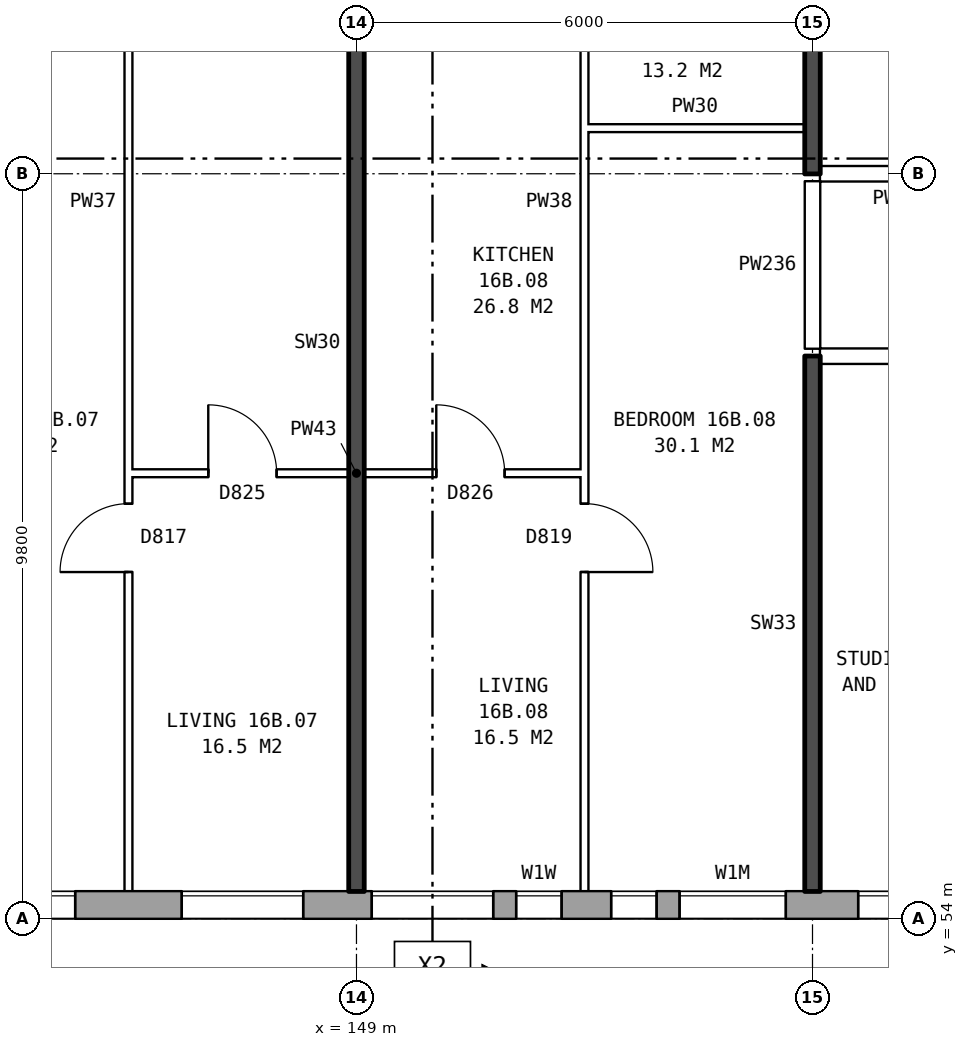
"""IFC4 building model, lengths in metres.
Left out: names, types, materials, properties, quantities, classifications, styles, units other than length and angle.
Written with IfcOpenShell. Run it as: python <this file> out.ifc"""

import sys

from ifc_helpers import new_model, si_unit, direction, frame, frame_2d, origin, place, context, subcontext, project, spatial, rectangle, extrude, element, fill, save


model = new_model("IFC4")
c1 = context("Model", 3, precision=1e-05, world=origin(), true_north=direction((0.0, 1.0)))
c2 = subcontext(c1, "Body", "Model", "MODEL_VIEW")
j1 = project(units=[si_unit("LENGTHUNIT", "METRE"), si_unit("PLANEANGLEUNIT", "RADIAN")], contexts=[c1])
p1 = place(None, origin())
s1 = spatial("IfcSite", under=j1, at=p1, CompositionType="ELEMENT")
p2 = place(p1, origin())
s2 = spatial("IfcBuilding", under=s1, at=p2, CompositionType="ELEMENT")
p3 = place(p2, frame((0.0, 0.0, 59.8)))
s3 = spatial("IfcBuildingStorey", under=s2, at=p3, CompositionType="ELEMENT", Elevation=59.8)
p4 = place(p3, frame((134.075, 54.18, 0.0), z_axis=(0.0, 0.0, 1.0), x_axis=(1.0, 0.0, 0.0)))
e1 = element("IfcWall", 1, at=p4, inside=s3, PredefinedType="STANDARD", context=c2, shape_type="SweptSolid", body=[
    extrude(rectangle(XDim=39.351, YDim=0.36, at=frame_2d((19.675, 0.0))), origin(), (0.0, 0.0, 1.0), 2.85),
])
p5 = place(p4, frame((0.625, 0.0, 0.8)))
e2 = element("IfcOpeningElement", 2, at=p5, cuts=e1, PredefinedType="OPENING", context=c2, shape_type="SweptSolid", body=[
    extrude(rectangle(XDim=1.6, YDim=1.8, at=frame_2d((0.8, 0.9))), frame((0.0, 0.19, 0.0), z_axis=(0.0, -1.0, 0.0), x_axis=(1.0, 0.0, 0.0)), (0.0, 0.0, 1.0), 0.38),
])
p6 = place(p4, frame((3.625, 0.0, 0.8)))
e3 = element("IfcOpeningElement", 3, at=p6, cuts=e1, PredefinedType="OPENING", context=c2, shape_type="SweptSolid", body=[
    extrude(rectangle(XDim=1.6, YDim=1.8, at=frame_2d((0.8, 0.9))), frame((0.0, 0.19, 0.0), z_axis=(0.0, -1.0, 0.0), x_axis=(1.0, 0.0, 0.0)), (0.0, 0.0, 1.0), 0.38),
])
p7 = place(p4, frame((6.625, 0.0, 0.8)))
e4 = element("IfcOpeningElement", 4, at=p7, cuts=e1, PredefinedType="OPENING", context=c2, shape_type="SweptSolid", body=[
    extrude(rectangle(XDim=1.6, YDim=1.8, at=frame_2d((0.8, 0.9))), frame((0.0, 0.19, 0.0), z_axis=(0.0, -1.0, 0.0), x_axis=(1.0, 0.0, 0.0)), (0.0, 0.0, 1.0), 0.38),
])
p8 = place(p4, frame((9.625, 0.0, 0.8)))
e5 = element("IfcOpeningElement", 5, at=p8, cuts=e1, PredefinedType="OPENING", context=c2, shape_type="SweptSolid", body=[
    extrude(rectangle(XDim=1.6, YDim=1.8, at=frame_2d((0.8, 0.9))), frame((0.0, 0.19, 0.0), z_axis=(0.0, -1.0, 0.0), x_axis=(1.0, 0.0, 0.0)), (0.0, 0.0, 1.0), 0.38),
])
p9 = place(p4, frame((12.625, 0.0, 0.8)))
e6 = element("IfcOpeningElement", 6, at=p9, cuts=e1, PredefinedType="OPENING", context=c2, shape_type="SweptSolid", body=[
    extrude(rectangle(XDim=1.6, YDim=1.8, at=frame_2d((0.8, 0.9))), frame((0.0, 0.19, 0.0), z_axis=(0.0, -1.0, 0.0), x_axis=(1.0, 0.0, 0.0)), (0.0, 0.0, 1.0), 0.38),
])
p10 = place(p4, frame((15.125, 0.0, 0.8)))
e7 = element("IfcOpeningElement", 7, at=p10, cuts=e1, PredefinedType="OPENING", context=c2, shape_type="SweptSolid", body=[
    extrude(rectangle(XDim=1.6, YDim=1.8, at=frame_2d((0.8, 0.9))), frame((0.0, 0.19, 0.0), z_axis=(0.0, -1.0, 0.0), x_axis=(1.0, 0.0, 0.0)), (0.0, 0.0, 1.0), 0.38),
])
p11 = place(p4, frame((18.275, 0.0, 0.15)))
e8 = element("IfcOpeningElement", 8, at=p11, cuts=e1, PredefinedType="OPENING", context=c2, shape_type="SweptSolid", body=[
    extrude(rectangle(XDim=0.6, YDim=0.9, at=frame_2d((0.3, 0.45))), frame((0.0, 0.19, 0.0), z_axis=(0.0, -1.0, 0.0), x_axis=(1.0, 0.0, 0.0)), (0.0, 0.0, 1.0), 0.38),
])
p12 = place(p4, frame((21.525, 0.0, 1.7)))
e9 = element("IfcOpeningElement", 9, at=p12, cuts=e1, PredefinedType="OPENING", context=c2, shape_type="SweptSolid", body=[
    extrude(rectangle(XDim=0.6, YDim=0.9, at=frame_2d((0.3, 0.45))), frame((0.0, 0.19, 0.0), z_axis=(0.0, -1.0, 0.0), x_axis=(1.0, 0.0, 0.0)), (0.0, 0.0, 1.0), 0.38),
])
p13 = place(p4, frame((24.625, 0.0, 0.8)))
e10 = element("IfcOpeningElement", 10, at=p13, cuts=e1, PredefinedType="OPENING", context=c2, shape_type="SweptSolid", body=[
    extrude(rectangle(XDim=1.6, YDim=1.8, at=frame_2d((0.8, 0.9))), frame((0.0, 0.19, 0.0), z_axis=(0.0, -1.0, 0.0), x_axis=(1.0, 0.0, 0.0)), (0.0, 0.0, 1.0), 0.38),
])
p14 = place(p4, frame((27.625, 0.0, 0.8)))
e11 = element("IfcOpeningElement", 11, at=p14, cuts=e1, PredefinedType="OPENING", context=c2, shape_type="SweptSolid", body=[
    extrude(rectangle(XDim=1.6, YDim=1.8, at=frame_2d((0.8, 0.9))), frame((0.0, 0.19, 0.0), z_axis=(0.0, -1.0, 0.0), x_axis=(1.0, 0.0, 0.0)), (0.0, 0.0, 1.0), 0.38),
])
p15 = place(p4, frame((30.625, 0.0, 0.8)))
e12 = element("IfcOpeningElement", 12, at=p15, cuts=e1, PredefinedType="OPENING", context=c2, shape_type="SweptSolid", body=[
    extrude(rectangle(XDim=1.6, YDim=1.8, at=frame_2d((0.8, 0.9))), frame((0.0, 0.19, 0.0), z_axis=(0.0, -1.0, 0.0), x_axis=(1.0, 0.0, 0.0)), (0.0, 0.0, 1.0), 0.38),
])
p16 = place(p4, frame((33.625, 0.0, 0.8)))
e13 = element("IfcOpeningElement", 13, at=p16, cuts=e1, PredefinedType="OPENING", context=c2, shape_type="SweptSolid", body=[
    extrude(rectangle(XDim=1.6, YDim=1.8, at=frame_2d((0.8, 0.9))), frame((0.0, 0.19, 0.0), z_axis=(0.0, -1.0, 0.0), x_axis=(1.0, 0.0, 0.0)), (0.0, 0.0, 1.0), 0.38),
])
p17 = place(p4, frame((36.625, 0.0, 0.8)))
e14 = element("IfcOpeningElement", 14, at=p17, cuts=e1, PredefinedType="OPENING", context=c2, shape_type="SweptSolid", body=[
    extrude(rectangle(XDim=1.6, YDim=1.8, at=frame_2d((0.8, 0.9))), frame((0.0, 0.19, 0.0), z_axis=(0.0, -1.0, 0.0), x_axis=(1.0, 0.0, 0.0)), (0.0, 0.0, 1.0), 0.38),
])
p18 = place(p4, frame((17.025, 0.0, 1.6)))
e15 = element("IfcOpeningElement", 15, at=p18, cuts=e1, PredefinedType="OPENING", context=c2, shape_type="SweptSolid", body=[
    extrude(rectangle(XDim=0.6, YDim=0.9, at=frame_2d((0.3, 0.45))), frame((0.0, 0.19, 0.0), z_axis=(0.0, -1.0, 0.0), x_axis=(1.0, 0.0, 0.0)), (0.0, 0.0, 1.0), 0.38),
])
p19 = place(p4, frame((19.175, 0.0, 0.25)))
e16 = element("IfcOpeningElement", 16, at=p19, cuts=e1, PredefinedType="OPENING", context=c2, shape_type="SweptSolid", body=[
    extrude(rectangle(XDim=1.4, YDim=1.2, at=frame_2d((0.7, 0.6))), frame((0.0, 0.19, 0.0), z_axis=(0.0, -1.0, 0.0), x_axis=(1.0, 0.0, 0.0)), (0.0, 0.0, 1.0), 0.38),
])
p20 = place(p4, frame((22.425, 0.0, 1.0)))
e17 = element("IfcOpeningElement", 17, at=p20, cuts=e1, PredefinedType="OPENING", context=c2, shape_type="SweptSolid", body=[
    extrude(rectangle(XDim=0.6, YDim=1.5, at=frame_2d((0.3, 0.75))), frame((0.0, 0.19, 0.0), z_axis=(0.0, -1.0, 0.0), x_axis=(1.0, 0.0, 0.0)), (0.0, 0.0, 1.0), 0.38),
])
p21 = place(p4, frame((23.325, 0.0, 0.8)))
e18 = element("IfcOpeningElement", 18, at=p21, cuts=e1, PredefinedType="OPENING", context=c2, shape_type="SweptSolid", body=[
    extrude(rectangle(XDim=1.0, YDim=1.8, at=frame_2d((0.5, 0.9))), frame((0.0, 0.19, 0.0), z_axis=(0.0, -1.0, 0.0), x_axis=(1.0, 0.0, 0.0)), (0.0, 0.0, 1.0), 0.38),
])
p22 = place(p3, frame((146.0, 59.86, 0.0), z_axis=(0.0, 0.0, 1.0), x_axis=(1.0, 0.0, 0.0)))
e19 = element("IfcWall", 19, at=p22, inside=s3, PredefinedType="PARTITIONING", context=c2, shape_type="SweptSolid", body=[
    extrude(rectangle(XDim=6.0, YDim=0.1, at=frame_2d((3.0, 0.0))), origin(), (0.0, 0.0, 1.0), 2.85),
])
p23 = place(p22, frame((1.05, 0.0, 0.0)))
e20 = element("IfcOpeningElement", 20, at=p23, cuts=e19, PredefinedType="OPENING", context=c2, shape_type="SweptSolid", body=[
    extrude(rectangle(XDim=0.9, YDim=2.1, at=frame_2d((0.45, 1.05))), frame((0.0, 0.06, 0.0), z_axis=(0.0, -1.0, 0.0), x_axis=(1.0, 0.0, 0.0)), (0.0, 0.0, 1.0), 0.12),
])
p24 = place(p22, frame((4.05, 0.0, 0.0)))
e21 = element("IfcOpeningElement", 21, at=p24, cuts=e19, PredefinedType="OPENING", context=c2, shape_type="SweptSolid", body=[
    extrude(rectangle(XDim=0.9, YDim=2.1, at=frame_2d((0.45, 1.05))), frame((0.0, 0.06, 0.0), z_axis=(0.0, -1.0, 0.0), x_axis=(1.0, 0.0, 0.0)), (0.0, 0.0, 1.0), 0.12),
])
p25 = place(p3, frame((155.1, 61.4, 0.0), z_axis=(0.0, 0.0, 1.0), x_axis=(1.0, 0.0, 0.0)))
e22 = element("IfcWall", 22, at=p25, inside=s3, PredefinedType="PARTITIONING", context=c2, shape_type="SweptSolid", body=[
    extrude(rectangle(XDim=21.04, YDim=0.2, at=frame_2d((10.52, 0.0))), origin(), (0.0, 0.0, 1.0), 2.85),
])
p26 = place(p25, frame((1.45, 0.0, 0.0)))
e23 = element("IfcOpeningElement", 23, at=p26, cuts=e22, PredefinedType="OPENING", context=c2, shape_type="SweptSolid", body=[
    extrude(rectangle(XDim=1.0, YDim=2.1, at=frame_2d((0.5, 1.05))), frame((0.0, 0.11, 0.0), z_axis=(0.0, -1.0, 0.0), x_axis=(1.0, 0.0, 0.0)), (0.0, 0.0, 1.0), 0.22),
])
p27 = place(p25, frame((7.4, 0.0, 0.0)))
e24 = element("IfcOpeningElement", 24, at=p27, cuts=e22, PredefinedType="OPENING", context=c2, shape_type="SweptSolid", body=[
    extrude(rectangle(XDim=1.0, YDim=2.1, at=frame_2d((0.5, 1.05))), frame((0.0, 0.11, 0.0), z_axis=(0.0, -1.0, 0.0), x_axis=(1.0, 0.0, 0.0)), (0.0, 0.0, 1.0), 0.22),
])
p28 = place(p25, frame((14.4, 0.0, 0.0)))
e25 = element("IfcOpeningElement", 25, at=p28, cuts=e22, PredefinedType="OPENING", context=c2, shape_type="SweptSolid", body=[
    extrude(rectangle(XDim=1.0, YDim=2.1, at=frame_2d((0.5, 1.05))), frame((0.0, 0.11, 0.0), z_axis=(0.0, -1.0, 0.0), x_axis=(1.0, 0.0, 0.0)), (0.0, 0.0, 1.0), 0.22),
])
p29 = place(p3, frame((155.1, 63.8, 0.0), z_axis=(0.0, 0.0, 1.0), x_axis=(1.0, 0.0, 0.0)))
e26 = element("IfcWall", 26, at=p29, inside=s3, PredefinedType="PARTITIONING", context=c2, shape_type="SweptSolid", body=[
    extrude(rectangle(XDim=2.14, YDim=0.2, at=frame_2d((1.07, 0.0))), origin(), (0.0, 0.0, 1.0), 2.85),
])
p30 = place(p3, frame((152.0, 64.4, 0.0), z_axis=(0.0, 0.0, 1.0), x_axis=(1.0, 0.0, 0.0)))
e27 = element("IfcWall", 27, at=p30, inside=s3, PredefinedType="PARTITIONING", context=c2, shape_type="SweptSolid", body=[
    extrude(rectangle(XDim=2.9, YDim=0.1, at=frame_2d((1.45, 0.0))), origin(), (0.0, 0.0, 1.0), 2.85),
])
p31 = place(p3, frame((146.0, 54.36, 0.0), z_axis=(0.0, 0.0, 1.0), x_axis=(0.0, 1.0, 0.0)))
e28 = element("IfcWall", 28, at=p31, inside=s3, PredefinedType="PARTITIONING", context=c2, shape_type="SweptSolid", body=[
    extrude(rectangle(XDim=14.34, YDim=0.1, at=frame_2d((7.17, 0.0))), origin(), (0.0, 0.0, 1.0), 2.85),
])
p32 = place(p31, frame((4.2, 0.0, 0.0)))
e29 = element("IfcOpeningElement", 29, at=p32, cuts=e28, PredefinedType="OPENING", context=c2, shape_type="SweptSolid", body=[
    extrude(rectangle(XDim=0.9, YDim=2.1, at=frame_2d((0.45, 1.05))), frame((0.0, 0.06, 0.0), z_axis=(0.0, -1.0, 0.0), x_axis=(1.0, 0.0, 0.0)), (0.0, 0.0, 1.0), 0.12),
])
p33 = place(p31, frame((13.04, 0.0, 0.0)))
e30 = element("IfcOpeningElement", 30, at=p33, cuts=e28, PredefinedType="OPENING", context=c2, shape_type="SweptSolid", body=[
    extrude(rectangle(XDim=0.9, YDim=2.1, at=frame_2d((0.45, 1.05))), frame((0.0, 0.06, 0.0), z_axis=(0.0, -1.0, 0.0), x_axis=(1.0, 0.0, 0.0)), (0.0, 0.0, 1.0), 0.12),
])
p34 = place(p3, frame((149.0, 54.36, 0.0), z_axis=(0.0, 0.0, 1.0), x_axis=(0.0, 1.0, 0.0)))
e31 = element("IfcWall", 31, at=p34, inside=s3, PredefinedType="SOLIDWALL", context=c2, shape_type="SweptSolid", body=[
    extrude(rectangle(XDim=14.44, YDim=0.2, at=frame_2d((7.22, 0.0))), origin(), (0.0, 0.0, 1.0), 2.85),
])
p35 = place(p3, frame((152.0, 54.36, 0.0), z_axis=(0.0, 0.0, 1.0), x_axis=(0.0, 1.0, 0.0)))
e32 = element("IfcWall", 32, at=p35, inside=s3, PredefinedType="PARTITIONING", context=c2, shape_type="SweptSolid", body=[
    extrude(rectangle(XDim=14.34, YDim=0.1, at=frame_2d((7.17, 0.0))), origin(), (0.0, 0.0, 1.0), 2.85),
])
p36 = place(p35, frame((4.2, 0.0, 0.0)))
e33 = element("IfcOpeningElement", 33, at=p36, cuts=e32, PredefinedType="OPENING", context=c2, shape_type="SweptSolid", body=[
    extrude(rectangle(XDim=0.9, YDim=2.1, at=frame_2d((0.45, 1.05))), frame((0.0, 0.06, 0.0), z_axis=(0.0, -1.0, 0.0), x_axis=(1.0, 0.0, 0.0)), (0.0, 0.0, 1.0), 0.12),
])
p37 = place(p35, frame((13.04, 0.0, 0.0)))
e34 = element("IfcOpeningElement", 34, at=p37, cuts=e32, PredefinedType="OPENING", context=c2, shape_type="SweptSolid", body=[
    extrude(rectangle(XDim=0.9, YDim=2.1, at=frame_2d((0.45, 1.05))), frame((0.0, 0.06, 0.0), z_axis=(0.0, -1.0, 0.0), x_axis=(1.0, 0.0, 0.0)), (0.0, 0.0, 1.0), 0.12),
])
p38 = place(p3, frame((155.0, 54.36, 0.0), z_axis=(0.0, 0.0, 1.0), x_axis=(0.0, 1.0, 0.0)))
e35 = element("IfcWall", 35, at=p38, inside=s3, PredefinedType="SOLIDWALL", context=c2, shape_type="SweptSolid", body=[
    extrude(rectangle(XDim=7.04, YDim=0.2, at=frame_2d((3.52, 0.0))), origin(), (0.0, 0.0, 1.0), 2.85),
])
p39 = place(p3, frame((155.0, 61.5, 0.0), z_axis=(0.0, 0.0, 1.0), x_axis=(0.0, 1.0, 0.0)))
e36 = element("IfcWall", 36, at=p39, inside=s3, PredefinedType="PARTITIONING", context=c2, shape_type="SweptSolid", body=[
    extrude(rectangle(XDim=2.2, YDim=0.2, at=frame_2d((1.1, 0.0))), origin(), (0.0, 0.0, 1.0), 2.85),
])
p40 = place(p3, frame((155.0, 63.8, 0.0), z_axis=(0.0, 0.0, 1.0), x_axis=(0.0, 1.0, 0.0)))
e37 = element("IfcWall", 37, at=p40, inside=s3, PredefinedType="SOLIDWALL", context=c2, shape_type="SweptSolid", body=[
    extrude(rectangle(XDim=5.0, YDim=0.2, at=frame_2d((2.5, 0.0))), origin(), (0.0, 0.0, 1.0), 2.85),
])
p41 = place(p8, origin())
e38 = element("IfcWindow", 38, at=p41, inside=s3, PartitioningType="SINGLE_PANEL", PredefinedType="WINDOW", context=c2, shape_type="SweptSolid", body=[
    extrude(rectangle(XDim=1.6, YDim=1.8, at=frame_2d((0.8, 0.9))), frame((0.0, 0.15, 0.0), z_axis=(0.0, -1.0, 0.0), x_axis=(1.0, 0.0, 0.0)), (0.0, 0.0, 1.0), 0.06),
])
fill(e5, e38)
p42 = place(p9, origin())
e39 = element("IfcWindow", 39, at=p42, inside=s3, PartitioningType="SINGLE_PANEL", PredefinedType="WINDOW", context=c2, shape_type="SweptSolid", body=[
    extrude(rectangle(XDim=1.6, YDim=1.8, at=frame_2d((0.8, 0.9))), frame((0.0, 0.15, 0.0), z_axis=(0.0, -1.0, 0.0), x_axis=(1.0, 0.0, 0.0)), (0.0, 0.0, 1.0), 0.06),
])
fill(e6, e39)
p43 = place(p10, origin())
e40 = element("IfcWindow", 40, at=p43, inside=s3, PartitioningType="SINGLE_PANEL", PredefinedType="WINDOW", context=c2, shape_type="SweptSolid", body=[
    extrude(rectangle(XDim=1.6, YDim=1.8, at=frame_2d((0.8, 0.9))), frame((0.0, 0.15, 0.0), z_axis=(0.0, -1.0, 0.0), x_axis=(1.0, 0.0, 0.0)), (0.0, 0.0, 1.0), 0.06),
])
fill(e7, e40)
p44 = place(p11, origin())
e41 = element("IfcWindow", 41, at=p44, inside=s3, PartitioningType="SINGLE_PANEL", PredefinedType="WINDOW", context=c2, shape_type="SweptSolid", body=[
    extrude(rectangle(XDim=0.6, YDim=0.9, at=frame_2d((0.3, 0.45))), frame((0.0, 0.15, 0.0), z_axis=(0.0, -1.0, 0.0), x_axis=(1.0, 0.0, 0.0)), (0.0, 0.0, 1.0), 0.06),
])
fill(e8, e41)
p45 = place(p12, origin())
e42 = element("IfcWindow", 42, at=p45, inside=s3, PartitioningType="SINGLE_PANEL", PredefinedType="WINDOW", context=c2, shape_type="SweptSolid", body=[
    extrude(rectangle(XDim=0.6, YDim=0.9, at=frame_2d((0.3, 0.45))), frame((0.0, 0.15, 0.0), z_axis=(0.0, -1.0, 0.0), x_axis=(1.0, 0.0, 0.0)), (0.0, 0.0, 1.0), 0.06),
])
fill(e9, e42)
p46 = place(p32, origin())
e43 = element("IfcDoor", 43, at=p46, inside=s3, OperationType="SINGLE_SWING_LEFT", PredefinedType="DOOR", context=c2, shape_type="SweptSolid", body=[
    extrude(rectangle(XDim=0.9, YDim=2.1, at=frame_2d((0.45, 1.05))), frame((0.0, 0.025, 0.0), z_axis=(0.0, -1.0, 0.0), x_axis=(1.0, 0.0, 0.0)), (0.0, 0.0, 1.0), 0.05),
])
fill(e29, e43)
p47 = place(p23, origin())
e44 = element("IfcDoor", 44, at=p47, inside=s3, OperationType="SINGLE_SWING_LEFT", PredefinedType="DOOR", context=c2, shape_type="SweptSolid", body=[
    extrude(rectangle(XDim=0.9, YDim=2.1, at=frame_2d((0.45, 1.05))), frame((0.0, 0.025, 0.0), z_axis=(0.0, -1.0, 0.0), x_axis=(1.0, 0.0, 0.0)), (0.0, 0.0, 1.0), 0.05),
])
fill(e20, e44)
p48 = place(p36, frame((0.9, 0.0, 0.0), z_axis=(0.0, 0.0, 1.0), x_axis=(-1.0, 0.0, 0.0)))
e45 = element("IfcDoor", 45, at=p48, inside=s3, OperationType="SINGLE_SWING_RIGHT", PredefinedType="DOOR", context=c2, shape_type="SweptSolid", body=[
    extrude(rectangle(XDim=0.9, YDim=2.1, at=frame_2d((0.45, 1.05))), frame((0.0, 0.025, 0.0), z_axis=(0.0, -1.0, 0.0), x_axis=(1.0, 0.0, 0.0)), (0.0, 0.0, 1.0), 0.05),
])
fill(e33, e45)
p49 = place(p24, origin())
e46 = element("IfcDoor", 46, at=p49, inside=s3, OperationType="SINGLE_SWING_LEFT", PredefinedType="DOOR", context=c2, shape_type="SweptSolid", body=[
    extrude(rectangle(XDim=0.9, YDim=2.1, at=frame_2d((0.45, 1.05))), frame((0.0, 0.025, 0.0), z_axis=(0.0, -1.0, 0.0), x_axis=(1.0, 0.0, 0.0)), (0.0, 0.0, 1.0), 0.05),
])
fill(e21, e46)
p50 = place(p18, origin())
e47 = element("IfcWindow", 47, at=p50, inside=s3, PartitioningType="SINGLE_PANEL", PredefinedType="WINDOW", context=c2, shape_type="SweptSolid", body=[
    extrude(rectangle(XDim=0.6, YDim=0.9, at=frame_2d((0.3, 0.45))), frame((0.0, 0.15, 0.0), z_axis=(0.0, -1.0, 0.0), x_axis=(1.0, 0.0, 0.0)), (0.0, 0.0, 1.0), 0.06),
])
fill(e15, e47)
p51 = place(p19, origin())
e48 = element("IfcWindow", 48, at=p51, inside=s3, PartitioningType="SINGLE_PANEL", PredefinedType="WINDOW", context=c2, shape_type="SweptSolid", body=[
    extrude(rectangle(XDim=1.4, YDim=1.2, at=frame_2d((0.7, 0.6))), frame((0.0, 0.15, 0.0), z_axis=(0.0, -1.0, 0.0), x_axis=(1.0, 0.0, 0.0)), (0.0, 0.0, 1.0), 0.06),
])
fill(e16, e48)
save(model, sys.argv[1])
